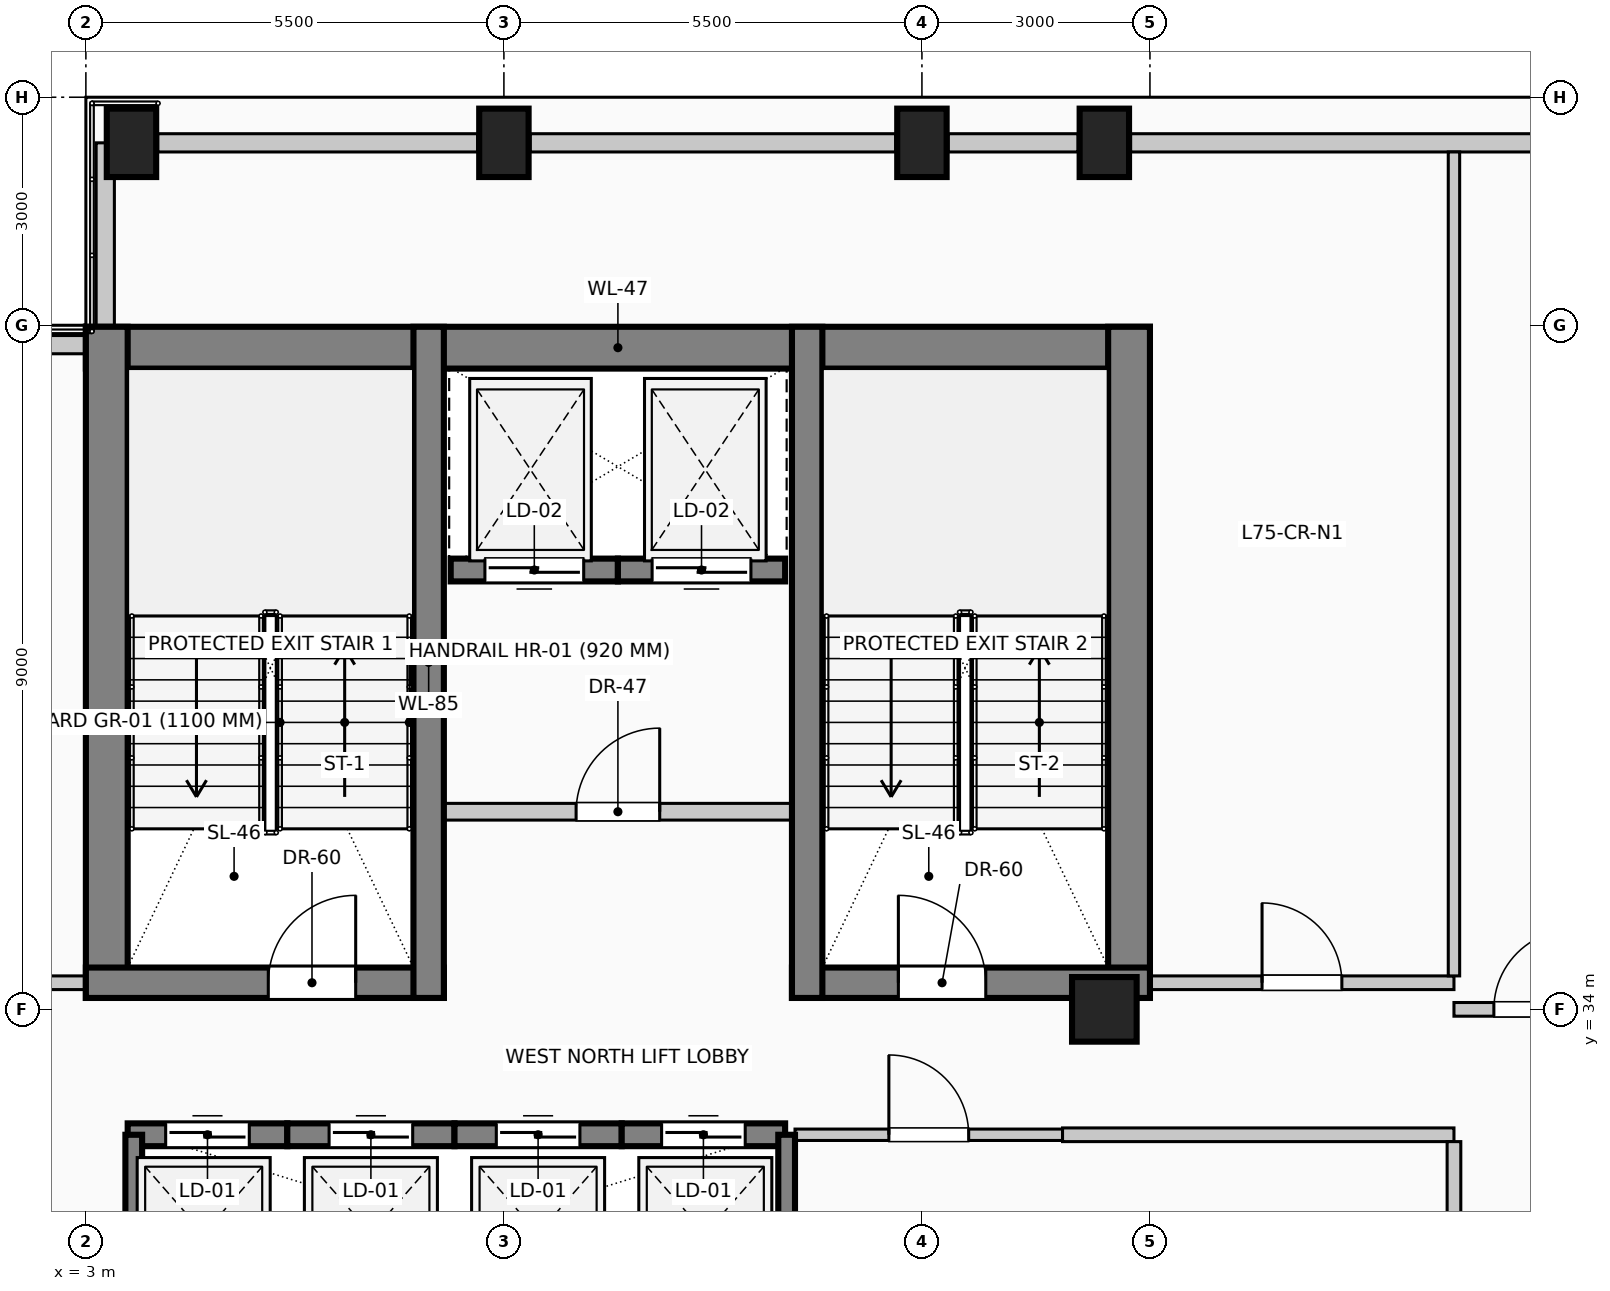
"""IFC4 building model, lengths in metres.
Left out: names, types, materials, properties, quantities, classifications, styles, units other than length and angle.
Written with IfcOpenShell. Run it as: python <this file> out.ifc"""

import sys

from ifc_helpers import new_model, si_unit, direction, frame, frame_2d, origin, origin_2d, place, context, subcontext, project, spatial, rectangle, circle, extrude, element, fill, save


model = new_model("IFC4")
c1 = context("Model", 3, precision=1e-05, world=origin(), true_north=direction((0.0, 1.0)))
c2 = subcontext(c1, "Body", "Model", "MODEL_VIEW")
j1 = project(units=[si_unit("LENGTHUNIT", "METRE"), si_unit("PLANEANGLEUNIT", "RADIAN")], contexts=[c1])
p1 = place(None, origin())
s1 = spatial("IfcSite", under=j1, at=p1, CompositionType="ELEMENT")
p2 = place(p1, origin())
s2 = spatial("IfcBuilding", under=s1, at=p2, CompositionType="ELEMENT")
p3 = place(p2, frame((0.0, 0.0, 309.0)))
s3 = spatial("IfcBuildingStorey", under=s2, at=p3, CompositionType="ELEMENT", Elevation=309.0)
p4 = place(p3, frame((3.0, 42.705, 0.0), z_axis=(0.0, 0.0, 1.0), x_axis=(1.0, 0.0, 0.0)))
e1 = element("IfcWall", 1, at=p4, inside=s3, PredefinedType="SHEAR", context=c2, shape_type="SweptSolid", body=[
    extrude(rectangle(XDim=14.0, YDim=0.55, at=frame_2d((7.0, 0.0))), origin(), (0.0, 0.0, 1.0), 4.0),
])
for number, where, z_axis, x_axis in (
    (2, (3.275, 34.15, 0.0), (0.0, 0.0, 1.0), (0.0, 1.0, 0.0)),
    (3, (16.725, 34.15, 0.0), (0.0, 0.0, 1.0), (0.0, 1.0, 0.0)),
):
    element("IfcWall", number, at=place(p3, frame(where, z_axis=z_axis, x_axis=x_axis)), inside=s3, PredefinedType="SHEAR", context=c2, shape_type="SweptSolid", body=[
        extrude(rectangle(XDim=8.83, YDim=0.55, at=frame_2d((4.415, 0.0))), origin(), (0.0, 0.0, 1.0), 4.0),
    ])
p5 = place(p3, frame((3.0, 34.35, 0.0), z_axis=(0.0, 0.0, 1.0), x_axis=(1.0, 0.0, 0.0)))
e4 = element("IfcWall", 4, at=p5, inside=s3, PredefinedType="SHEAR", context=c2, shape_type="SweptSolid", body=[
    extrude(rectangle(XDim=4.71, YDim=0.4, at=frame_2d((2.355, 0.0))), origin(), (0.0, 0.0, 1.0), 4.0),
])
p6 = place(p5, frame((2.4, 0.0, 0.0)))
e5 = element("IfcOpeningElement", 5, at=p6, cuts=e4, PredefinedType="OPENING", context=c2, shape_type="SweptSolid", body=[
    extrude(rectangle(XDim=1.15, YDim=2.2, at=frame_2d((0.575, 1.1))), frame((0.0, 0.21, 0.0), z_axis=(0.0, -1.0, 0.0), x_axis=(1.0, 0.0, 0.0)), (0.0, 0.0, 1.0), 0.42),
])
p7 = place(p3, frame((12.29, 34.35, 0.0), z_axis=(0.0, 0.0, 1.0), x_axis=(1.0, 0.0, 0.0)))
e6 = element("IfcWall", 6, at=p7, inside=s3, PredefinedType="SHEAR", context=c2, shape_type="SweptSolid", body=[
    extrude(rectangle(XDim=4.71, YDim=0.4, at=frame_2d((2.355, 0.0))), origin(), (0.0, 0.0, 1.0), 4.0),
])
p8 = place(p7, frame((1.4, 0.0, 0.0)))
e7 = element("IfcOpeningElement", 7, at=p8, cuts=e6, PredefinedType="OPENING", context=c2, shape_type="SweptSolid", body=[
    extrude(rectangle(XDim=1.15, YDim=2.2, at=frame_2d((0.575, 1.1))), frame((0.0, 0.21, 0.0), z_axis=(0.0, -1.0, 0.0), x_axis=(1.0, 0.0, 0.0)), (0.0, 0.0, 1.0), 0.42),
])
for number, where, z_axis, x_axis in (
    (8, (7.51, 34.15, 0.0), (0.0, 0.0, 1.0), (0.0, 1.0, 0.0)),
    (9, (12.49, 34.15, 0.0), (0.0, 0.0, 1.0), (0.0, 1.0, 0.0)),
):
    element("IfcWall", number, at=place(p3, frame(where, z_axis=z_axis, x_axis=x_axis)), inside=s3, PredefinedType="SHEAR", context=c2, shape_type="SweptSolid", body=[
        extrude(rectangle(XDim=8.83, YDim=0.4, at=frame_2d((4.415, 0.0))), origin(), (0.0, 0.0, 1.0), 4.0),
    ])
for number, where, z_axis, x_axis in (
    (10, (3.6, 45.4, 0.0), (0.0, 0.0, 1.0), (1.0, 0.0, 0.0)),
    (11, (8.5, 45.4, 0.0), (0.0, 0.0, 1.0), (1.0, 0.0, 0.0)),
    (12, (14.0, 45.4, 0.0), (0.0, 0.0, 1.0), (1.0, 0.0, 0.0)),
    (13, (16.4, 45.4, 0.0), (0.0, 0.0, 1.0), (1.0, 0.0, 0.0)),
):
    element("IfcColumn", number, at=place(p3, frame(where, z_axis=z_axis, x_axis=x_axis)), inside=s3, PredefinedType="COLUMN", context=c2, shape_type="SweptSolid", body=[
        extrude(rectangle(XDim=0.65, YDim=0.9, at=origin_2d()), origin(), (0.0, 0.0, 1.0), 4.0),
    ])
p9 = place(p3, frame((16.4, 34.0, 0.0), z_axis=(0.0, 0.0, 1.0), x_axis=(1.0, 0.0, 0.0)))
e14 = element("IfcColumn", 14, at=p9, inside=s3, PredefinedType="COLUMN", context=c2, shape_type="SweptSolid", body=[
    extrude(circle(Radius=0.425, at=origin_2d()), origin(), (0.0, 0.0, 1.0), 4.0),
])
p10 = place(p3, frame((3.945, 45.4, 0.0), z_axis=(0.0, 0.0, 1.0), x_axis=(1.0, 0.0, 0.0)))
e15 = element("IfcWall", 15, at=p10, inside=s3, PredefinedType="SOLIDWALL", context=c2, shape_type="SweptSolid", body=[
    extrude(rectangle(XDim=4.21, YDim=0.24, at=frame_2d((2.105, 0.0))), origin(), (0.0, 0.0, 1.0), 3.025),
])
p11 = place(p3, frame((8.845, 45.4, 0.0), z_axis=(0.0, 0.0, 1.0), x_axis=(1.0, 0.0, 0.0)))
e16 = element("IfcWall", 16, at=p11, inside=s3, PredefinedType="SOLIDWALL", context=c2, shape_type="SweptSolid", body=[
    extrude(rectangle(XDim=4.81, YDim=0.24, at=frame_2d((2.405, 0.0))), origin(), (0.0, 0.0, 1.0), 3.025),
])
p12 = place(p3, frame((14.345, 45.4, 0.0), z_axis=(0.0, 0.0, 1.0), x_axis=(1.0, 0.0, 0.0)))
e17 = element("IfcWall", 17, at=p12, inside=s3, PredefinedType="SOLIDWALL", context=c2, shape_type="SweptSolid", body=[
    extrude(rectangle(XDim=1.71, YDim=0.24, at=frame_2d((0.855, 0.0))), origin(), (0.0, 0.0, 1.0), 3.025),
])
p13 = place(p3, frame((16.745, 45.4, 0.0), z_axis=(0.0, 0.0, 1.0), x_axis=(1.0, 0.0, 0.0)))
e18 = element("IfcWall", 18, at=p13, inside=s3, PredefinedType="SOLIDWALL", context=c2, shape_type="SweptSolid", body=[
    extrude(rectangle(XDim=6.91, YDim=0.24, at=frame_2d((3.455, 0.0))), origin(), (0.0, 0.0, 1.0), 3.025),
])
p14 = place(p3, frame((0.6, 42.745, 0.0), z_axis=(0.0, 0.0, 1.0), x_axis=(1.0, 0.0, 0.0)))
e19 = element("IfcWall", 19, at=p14, inside=s3, PredefinedType="SOLIDWALL", context=c2, shape_type="SweptSolid", body=[
    extrude(rectangle(XDim=2.395, YDim=0.24, at=frame_2d((1.198, 0.0))), origin(), (0.0, 0.0, 1.0), 3.775),
])
p15 = place(p3, frame((3.255, 42.985, 0.0), z_axis=(0.0, 0.0, 1.0), x_axis=(0.0, 1.0, 0.0)))
e20 = element("IfcWall", 20, at=p15, inside=s3, PredefinedType="SOLIDWALL", context=c2, shape_type="SweptSolid", body=[
    extrude(rectangle(XDim=2.415, YDim=0.24, at=frame_2d((1.208, 0.0))), origin(), (0.0, 0.0, 1.0), 3.775),
])
p16 = place(p3, frame((3.55, 32.35, 0.0), z_axis=(0.0, 0.0, 1.0), x_axis=(1.0, 0.0, 0.0)))
e21 = element("IfcWall", 21, at=p16, inside=s3, PredefinedType="SOLIDWALL", context=c2, shape_type="SweptSolid", body=[
    extrude(rectangle(XDim=2.1, YDim=0.3, at=frame_2d((1.05, 0.0))), origin(), (0.0, 0.0, 1.0), 4.0),
])
p17 = place(p16, frame((0.5, 0.0, 0.0)))
e22 = element("IfcOpeningElement", 22, at=p17, cuts=e21, PredefinedType="OPENING", context=c2, shape_type="SweptSolid", body=[
    extrude(rectangle(XDim=1.1, YDim=2.2, at=frame_2d((0.55, 1.1))), frame((0.0, 0.16, 0.0), z_axis=(0.0, -1.0, 0.0), x_axis=(1.0, 0.0, 0.0)), (0.0, 0.0, 1.0), 0.32),
])
p18 = place(p3, frame((5.65, 32.35, 0.0), z_axis=(0.0, 0.0, 1.0), x_axis=(1.0, 0.0, 0.0)))
e23 = element("IfcWall", 23, at=p18, inside=s3, PredefinedType="SOLIDWALL", context=c2, shape_type="SweptSolid", body=[
    extrude(rectangle(XDim=2.2, YDim=0.3, at=frame_2d((1.1, 0.0))), origin(), (0.0, 0.0, 1.0), 4.0),
])
p19 = place(p18, frame((0.55, 0.0, 0.0)))
e24 = element("IfcOpeningElement", 24, at=p19, cuts=e23, PredefinedType="OPENING", context=c2, shape_type="SweptSolid", body=[
    extrude(rectangle(XDim=1.1, YDim=2.2, at=frame_2d((0.55, 1.1))), frame((0.0, 0.16, 0.0), z_axis=(0.0, -1.0, 0.0), x_axis=(1.0, 0.0, 0.0)), (0.0, 0.0, 1.0), 0.32),
])
p20 = place(p3, frame((7.85, 32.35, 0.0), z_axis=(0.0, 0.0, 1.0), x_axis=(1.0, 0.0, 0.0)))
e25 = element("IfcWall", 25, at=p20, inside=s3, PredefinedType="SOLIDWALL", context=c2, shape_type="SweptSolid", body=[
    extrude(rectangle(XDim=2.2, YDim=0.3, at=frame_2d((1.1, 0.0))), origin(), (0.0, 0.0, 1.0), 4.0),
])
p21 = place(p20, frame((0.55, 0.0, 0.0)))
e26 = element("IfcOpeningElement", 26, at=p21, cuts=e25, PredefinedType="OPENING", context=c2, shape_type="SweptSolid", body=[
    extrude(rectangle(XDim=1.1, YDim=2.2, at=frame_2d((0.55, 1.1))), frame((0.0, 0.16, 0.0), z_axis=(0.0, -1.0, 0.0), x_axis=(1.0, 0.0, 0.0)), (0.0, 0.0, 1.0), 0.32),
])
p22 = place(p3, frame((10.05, 32.35, 0.0), z_axis=(0.0, 0.0, 1.0), x_axis=(1.0, 0.0, 0.0)))
e27 = element("IfcWall", 27, at=p22, inside=s3, PredefinedType="SOLIDWALL", context=c2, shape_type="SweptSolid", body=[
    extrude(rectangle(XDim=2.15, YDim=0.3, at=frame_2d((1.075, 0.0))), origin(), (0.0, 0.0, 1.0), 4.0),
])
p23 = place(p22, frame((0.525, 0.0, 0.0)))
e28 = element("IfcOpeningElement", 28, at=p23, cuts=e27, PredefinedType="OPENING", context=c2, shape_type="SweptSolid", body=[
    extrude(rectangle(XDim=1.1, YDim=2.2, at=frame_2d((0.55, 1.1))), frame((0.0, 0.16, 0.0), z_axis=(0.0, -1.0, 0.0), x_axis=(1.0, 0.0, 0.0)), (0.0, 0.0, 1.0), 0.32),
])
p24 = place(p3, frame((10.0, 39.78, 0.0), z_axis=(0.0, 0.0, 1.0), x_axis=(-1.0, 0.0, 0.0)))
e29 = element("IfcWall", 29, at=p24, inside=s3, PredefinedType="SOLIDWALL", context=c2, shape_type="SweptSolid", body=[
    extrude(rectangle(XDim=2.2, YDim=0.3, at=frame_2d((1.1, 0.0))), origin(), (0.0, 0.0, 1.0), 4.0),
])
p25 = place(p24, frame((0.45, 0.0, 0.0)))
e30 = element("IfcOpeningElement", 30, at=p25, cuts=e29, PredefinedType="OPENING", context=c2, shape_type="SweptSolid", body=[
    extrude(rectangle(XDim=1.3, YDim=2.25, at=frame_2d((0.65, 1.125))), frame((0.0, 0.16, 0.0), z_axis=(0.0, -1.0, 0.0), x_axis=(1.0, 0.0, 0.0)), (0.0, 0.0, 1.0), 0.32),
])
p26 = place(p3, frame((12.2, 39.78, 0.0), z_axis=(0.0, 0.0, 1.0), x_axis=(-1.0, 0.0, 0.0)))
e31 = element("IfcWall", 31, at=p26, inside=s3, PredefinedType="SOLIDWALL", context=c2, shape_type="SweptSolid", body=[
    extrude(rectangle(XDim=2.2, YDim=0.3, at=frame_2d((1.1, 0.0))), origin(), (0.0, 0.0, 1.0), 4.0),
])
p27 = place(p26, frame((0.45, 0.0, 0.0)))
e32 = element("IfcOpeningElement", 32, at=p27, cuts=e31, PredefinedType="OPENING", context=c2, shape_type="SweptSolid", body=[
    extrude(rectangle(XDim=1.3, YDim=2.25, at=frame_2d((0.65, 1.125))), frame((0.0, 0.16, 0.0), z_axis=(0.0, -1.0, 0.0), x_axis=(1.0, 0.0, 0.0)), (0.0, 0.0, 1.0), 0.32),
])
p28 = place(p3, frame((3.63, 26.8, 0.0), z_axis=(0.0, 0.0, 1.0), x_axis=(0.0, 1.0, 0.0)))
e33 = element("IfcWall", 33, at=p28, inside=s3, PredefinedType="SOLIDWALL", context=c2, shape_type="SweptSolid", body=[
    extrude(rectangle(XDim=5.55, YDim=0.22, at=frame_2d((2.775, 0.0))), origin(), (0.0, 0.0, 1.0), 4.0),
])
p29 = place(p3, frame((12.22, 29.75, 0.0), z_axis=(0.0, 0.0, 1.0), x_axis=(0.0, 1.0, 0.0)))
e34 = element("IfcWall", 34, at=p29, inside=s3, PredefinedType="SOLIDWALL", context=c2, shape_type="SweptSolid", body=[
    extrude(rectangle(XDim=2.6, YDim=0.22, at=frame_2d((1.3, 0.0))), origin(), (0.0, 0.0, 1.0), 4.0),
])
p30 = place(p3, frame((7.51, 36.6, 0.0), z_axis=(0.0, 0.0, 1.0), x_axis=(1.0, 0.0, 0.0)))
e35 = element("IfcWall", 35, at=p30, inside=s3, PredefinedType="PARTITIONING", context=c2, shape_type="SweptSolid", body=[
    extrude(rectangle(XDim=4.98, YDim=0.22, at=frame_2d((2.49, 0.0))), origin(), (0.0, 0.0, 1.0), 3.775),
])
p31 = place(p30, frame((1.94, 0.0, 0.0)))
e36 = element("IfcOpeningElement", 36, at=p31, cuts=e35, PredefinedType="OPENING", context=c2, shape_type="SweptSolid", body=[
    extrude(rectangle(XDim=1.1, YDim=2.2, at=frame_2d((0.55, 1.1))), frame((0.0, 0.12, 0.0), z_axis=(0.0, -1.0, 0.0), x_axis=(1.0, 0.0, 0.0)), (0.0, 0.0, 1.0), 0.24),
])
p32 = place(p3, frame((12.33, 32.35, 0.0), z_axis=(0.0, 0.0, 1.0), x_axis=(1.0, 0.0, 0.0)))
e37 = element("IfcWall", 37, at=p32, inside=s3, PredefinedType="PARTITIONING", context=c2, shape_type="SweptSolid", body=[
    extrude(rectangle(XDim=3.52, YDim=0.15, at=frame_2d((1.76, 0.0))), origin(), (0.0, 0.0, 1.0), 3.775),
])
p33 = place(p32, frame((1.235, 0.0, 0.0)))
e38 = element("IfcOpeningElement", 38, at=p33, cuts=e37, PredefinedType="OPENING", context=c2, shape_type="SweptSolid", body=[
    extrude(rectangle(XDim=1.05, YDim=2.15, at=frame_2d((0.525, 1.075))), frame((0.0, 0.085, 0.0), z_axis=(0.0, -1.0, 0.0), x_axis=(1.0, 0.0, 0.0)), (0.0, 0.0, 1.0), 0.17),
])
p34 = place(p3, frame((15.85, 32.35, 0.0), z_axis=(0.0, 0.0, 1.0), x_axis=(1.0, 0.0, 0.0)))
e39 = element("IfcWall", 39, at=p34, inside=s3, PredefinedType="PARTITIONING", context=c2, shape_type="SweptSolid", body=[
    extrude(rectangle(XDim=5.15, YDim=0.18, at=frame_2d((2.575, 0.0))), origin(), (0.0, 0.0, 1.0), 3.775),
])
p35 = place(p3, frame((21.0, 34.0, 0.0), z_axis=(0.0, 0.0, 1.0), x_axis=(1.0, 0.0, 0.0)))
e40 = element("IfcWall", 40, at=p35, inside=s3, PredefinedType="PARTITIONING", context=c2, shape_type="SweptSolid", body=[
    extrude(rectangle(XDim=2.1, YDim=0.18, at=frame_2d((1.05, 0.0))), origin(), (0.0, 0.0, 1.0), 3.27),
])
p36 = place(p35, frame((0.525, 0.0, 0.0)))
e41 = element("IfcOpeningElement", 41, at=p36, cuts=e40, PredefinedType="OPENING", context=c2, shape_type="SweptSolid", body=[
    extrude(rectangle(XDim=1.05, YDim=2.15, at=frame_2d((0.525, 1.075))), frame((0.0, 0.1, 0.0), z_axis=(0.0, -1.0, 0.0), x_axis=(1.0, 0.0, 0.0)), (0.0, 0.0, 1.0), 0.2),
])
p37 = place(p3, frame((1.05, 34.35, 0.0), z_axis=(0.0, 0.0, 1.0), x_axis=(1.0, 0.0, 0.0)))
e42 = element("IfcWall", 42, at=p37, inside=s3, PredefinedType="PARTITIONING", context=c2, shape_type="SweptSolid", body=[
    extrude(rectangle(XDim=1.95, YDim=0.18, at=frame_2d((0.975, 0.0))), origin(), (0.0, 0.0, 1.0), 3.775),
])
p38 = place(p3, frame((17.0, 34.35, 0.0), z_axis=(0.0, 0.0, 1.0), x_axis=(1.0, 0.0, 0.0)))
e43 = element("IfcWall", 43, at=p38, inside=s3, PredefinedType="PARTITIONING", context=c2, shape_type="SweptSolid", body=[
    extrude(rectangle(XDim=4.0, YDim=0.18, at=frame_2d((2.0, 0.0))), origin(), (0.0, 0.0, 1.0), 3.775),
])
p39 = place(p38, frame((1.475, 0.0, 0.0)))
e44 = element("IfcOpeningElement", 44, at=p39, cuts=e43, PredefinedType="OPENING", context=c2, shape_type="SweptSolid", body=[
    extrude(rectangle(XDim=1.05, YDim=2.15, at=frame_2d((0.525, 1.075))), frame((0.0, 0.1, 0.0), z_axis=(0.0, -1.0, 0.0), x_axis=(1.0, 0.0, 0.0)), (0.0, 0.0, 1.0), 0.2),
])
p40 = place(p3, frame((21.0, 28.675, 0.0), z_axis=(0.0, 0.0, 1.0), x_axis=(0.0, 1.0, 0.0)))
e45 = element("IfcWall", 45, at=p40, inside=s3, PredefinedType="PARTITIONING", context=c2, shape_type="SweptSolid", body=[
    extrude(rectangle(XDim=3.585, YDim=0.18, at=frame_2d((1.792, 0.0))), origin(), (0.0, 0.0, 1.0), 3.775),
])
p41 = place(p3, frame((21.0, 34.44, 0.0), z_axis=(0.0, 0.0, 1.0), x_axis=(0.0, 1.0, 0.0)))
e46 = element("IfcWall", 46, at=p41, inside=s3, PredefinedType="PARTITIONING", context=c2, shape_type="SweptSolid", body=[
    extrude(rectangle(XDim=10.84, YDim=0.15, at=frame_2d((5.42, 0.0))), origin(), (0.0, 0.0, 1.0), 3.775),
])
p42 = place(p17, origin())
e47 = element("IfcDoor", 47, at=p42, inside=s3, OperationType="SLIDING_TO_LEFT", PredefinedType="DOOR", context=c2, shape_type="SweptSolid", body=[
    extrude(rectangle(XDim=1.1, YDim=2.2, at=frame_2d((0.55, 1.1))), frame((0.0, 0.025, 0.0), z_axis=(0.0, -1.0, 0.0), x_axis=(1.0, 0.0, 0.0)), (0.0, 0.0, 1.0), 0.05),
])
fill(e22, e47)
p43 = place(p19, origin())
e48 = element("IfcDoor", 48, at=p43, inside=s3, OperationType="SLIDING_TO_RIGHT", PredefinedType="DOOR", context=c2, shape_type="SweptSolid", body=[
    extrude(rectangle(XDim=1.1, YDim=2.2, at=frame_2d((0.55, 1.1))), frame((0.0, 0.025, 0.0), z_axis=(0.0, -1.0, 0.0), x_axis=(1.0, 0.0, 0.0)), (0.0, 0.0, 1.0), 0.05),
])
fill(e24, e48)
p44 = place(p21, origin())
e49 = element("IfcDoor", 49, at=p44, inside=s3, OperationType="SLIDING_TO_LEFT", PredefinedType="DOOR", context=c2, shape_type="SweptSolid", body=[
    extrude(rectangle(XDim=1.1, YDim=2.2, at=frame_2d((0.55, 1.1))), frame((0.0, 0.025, 0.0), z_axis=(0.0, -1.0, 0.0), x_axis=(1.0, 0.0, 0.0)), (0.0, 0.0, 1.0), 0.05),
])
fill(e26, e49)
p45 = place(p23, origin())
e50 = element("IfcDoor", 50, at=p45, inside=s3, OperationType="SLIDING_TO_RIGHT", PredefinedType="DOOR", context=c2, shape_type="SweptSolid", body=[
    extrude(rectangle(XDim=1.1, YDim=2.2, at=frame_2d((0.55, 1.1))), frame((0.0, 0.025, 0.0), z_axis=(0.0, -1.0, 0.0), x_axis=(1.0, 0.0, 0.0)), (0.0, 0.0, 1.0), 0.05),
])
fill(e28, e50)
p46 = place(p25, origin())
e51 = element("IfcDoor", 51, at=p46, inside=s3, OperationType="SLIDING_TO_LEFT", PredefinedType="DOOR", context=c2, shape_type="SweptSolid", body=[
    extrude(rectangle(XDim=1.3, YDim=2.25, at=frame_2d((0.65, 1.125))), frame((0.0, 0.025, 0.0), z_axis=(0.0, -1.0, 0.0), x_axis=(1.0, 0.0, 0.0)), (0.0, 0.0, 1.0), 0.05),
])
fill(e30, e51)
p47 = place(p27, origin())
e52 = element("IfcDoor", 52, at=p47, inside=s3, OperationType="SLIDING_TO_RIGHT", PredefinedType="DOOR", context=c2, shape_type="SweptSolid", body=[
    extrude(rectangle(XDim=1.3, YDim=2.25, at=frame_2d((0.65, 1.125))), frame((0.0, 0.025, 0.0), z_axis=(0.0, -1.0, 0.0), x_axis=(1.0, 0.0, 0.0)), (0.0, 0.0, 1.0), 0.05),
])
fill(e32, e52)
p48 = place(p6, origin())
e53 = element("IfcDoor", 53, at=p48, inside=s3, OperationType="SINGLE_SWING_RIGHT", PredefinedType="DOOR", context=c2, shape_type="SweptSolid", body=[
    extrude(rectangle(XDim=1.15, YDim=2.2, at=frame_2d((0.575, 1.1))), frame((0.0, 0.025, 0.0), z_axis=(0.0, -1.0, 0.0), x_axis=(1.0, 0.0, 0.0)), (0.0, 0.0, 1.0), 0.05),
])
fill(e5, e53)
p49 = place(p8, origin())
e54 = element("IfcDoor", 54, at=p49, inside=s3, OperationType="SINGLE_SWING_LEFT", PredefinedType="DOOR", context=c2, shape_type="SweptSolid", body=[
    extrude(rectangle(XDim=1.15, YDim=2.2, at=frame_2d((0.575, 1.1))), frame((0.0, 0.025, 0.0), z_axis=(0.0, -1.0, 0.0), x_axis=(1.0, 0.0, 0.0)), (0.0, 0.0, 1.0), 0.05),
])
fill(e7, e54)
p50 = place(p31, origin())
e55 = element("IfcDoor", 55, at=p50, inside=s3, OperationType="SINGLE_SWING_RIGHT", PredefinedType="DOOR", context=c2, shape_type="SweptSolid", body=[
    extrude(rectangle(XDim=1.1, YDim=2.2, at=frame_2d((0.55, 1.1))), frame((0.0, 0.025, 0.0), z_axis=(0.0, -1.0, 0.0), x_axis=(1.0, 0.0, 0.0)), (0.0, 0.0, 1.0), 0.05),
])
fill(e36, e55)
p51 = place(p33, origin())
e56 = element("IfcDoor", 56, at=p51, inside=s3, OperationType="SINGLE_SWING_LEFT", PredefinedType="DOOR", context=c2, shape_type="SweptSolid", body=[
    extrude(rectangle(XDim=1.05, YDim=2.15, at=frame_2d((0.525, 1.075))), frame((0.0, 0.025, 0.0), z_axis=(0.0, -1.0, 0.0), x_axis=(1.0, 0.0, 0.0)), (0.0, 0.0, 1.0), 0.05),
])
fill(e38, e56)
p52 = place(p36, origin())
e57 = element("IfcDoor", 57, at=p52, inside=s3, OperationType="SINGLE_SWING_RIGHT", PredefinedType="DOOR", context=c2, shape_type="SweptSolid", body=[
    extrude(rectangle(XDim=1.05, YDim=2.15, at=frame_2d((0.525, 1.075))), frame((0.0, 0.025, 0.0), z_axis=(0.0, -1.0, 0.0), x_axis=(1.0, 0.0, 0.0)), (0.0, 0.0, 1.0), 0.05),
])
fill(e41, e57)
p53 = place(p39, origin())
e58 = element("IfcDoor", 58, at=p53, inside=s3, OperationType="SINGLE_SWING_LEFT", PredefinedType="DOOR", context=c2, shape_type="SweptSolid", body=[
    extrude(rectangle(XDim=1.05, YDim=2.15, at=frame_2d((0.525, 1.075))), frame((0.0, 0.025, 0.0), z_axis=(0.0, -1.0, 0.0), x_axis=(1.0, 0.0, 0.0)), (0.0, 0.0, 1.0), 0.05),
])
fill(e44, e58)
save(model, sys.argv[1])
